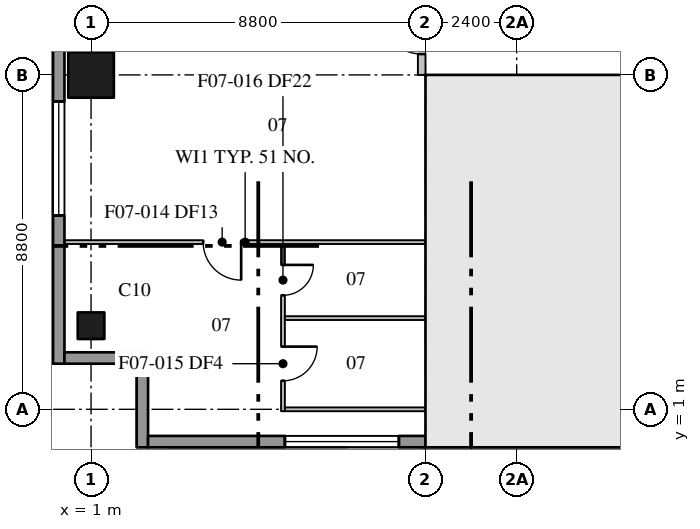
"""IFC4 building model, lengths in metres.
Left out: names, types, materials, properties, quantities, classifications, styles, units other than length and angle.
Written with IfcOpenShell. Run it as: python <this file> out.ifc"""

import sys

from ifc_helpers import new_model, si_unit, direction, frame, frame_2d, origin, origin_2d, place, context, subcontext, project, spatial, rectangle, extrude, element, fill, save


model = new_model("IFC4")
c1 = context("Model", 3, precision=1e-05, world=origin(), true_north=direction((0.0, 1.0)))
c2 = subcontext(c1, "Body", "Model", "MODEL_VIEW")
j1 = project(units=[si_unit("LENGTHUNIT", "METRE"), si_unit("PLANEANGLEUNIT", "RADIAN")], contexts=[c1])
p1 = place(None, origin())
s1 = spatial("IfcSite", under=j1, at=p1, CompositionType="ELEMENT")
p2 = place(p1, origin())
s2 = spatial("IfcBuilding", under=s1, at=p2, CompositionType="ELEMENT")
p3 = place(p2, frame((0.0, 0.0, 87.1)))
s3 = spatial("IfcBuildingStorey", under=s2, at=p3, CompositionType="ELEMENT", Elevation=87.1)
p4 = place(p3, frame((1.0, 3.2, 0.0), z_axis=(0.0, 0.0, 1.0), x_axis=(1.0, 0.0, 0.0)))
e1 = element("IfcColumn", 1, at=p4, inside=s3, PredefinedType="COLUMN", context=c2, shape_type="SweptSolid", body=[
    extrude(rectangle(XDim=0.7, YDim=0.7, at=origin_2d()), origin(), (0.0, 0.0, 1.0), 3.7),
])
p5 = place(p3, frame((1.0, 9.8, 0.0), z_axis=(0.0, 0.0, 1.0), x_axis=(1.0, 0.0, 0.0)))
e2 = element("IfcColumn", 2, at=p5, inside=s3, PredefinedType="COLUMN", context=c2, shape_type="SweptSolid", body=[
    extrude(rectangle(XDim=1.2, YDim=1.2, at=origin_2d()), origin(), (0.0, 0.0, 1.0), 3.7),
])
p6 = place(p3, frame((9.8, 0.8, 0.0), z_axis=(0.0, 0.0, 1.0), x_axis=(1.0, 0.0, 0.0)))
e3 = element("IfcWall", 3, at=p6, inside=s3, PredefinedType="SHEAR", context=c2, shape_type="SweptSolid", body=[
    extrude(rectangle(XDim=35.2, YDim=0.8, at=frame_2d((17.6, 0.0))), origin(), (0.0, 0.0, 1.0), 3.7),
])
p7 = place(p3, frame((10.6, 1.2, 0.0), z_axis=(0.0, 0.0, 1.0), x_axis=(0.0, 1.0, 0.0)))
e4 = element("IfcWall", 4, at=p7, inside=s3, PredefinedType="SHEAR", context=c2, shape_type="SweptSolid", body=[
    extrude(rectangle(XDim=8.6, YDim=0.8, at=frame_2d((4.3, 0.0))), origin(), (0.0, 0.0, 1.0), 3.7),
])
p8 = place(p3, frame((9.8, 9.6, 0.0), z_axis=(0.0, 0.0, 1.0), x_axis=(1.0, 0.0, 0.0)))
e5 = element("IfcWall", 5, at=p8, inside=s3, PredefinedType="SHEAR", context=c2, shape_type="SweptSolid", body=[
    extrude(rectangle(XDim=4.3, YDim=0.4, at=frame_2d((2.15, 0.0))), origin(), (0.0, 0.0, 1.0), 3.7),
])
p9 = place(p8, frame((2.05, 0.0, 0.0)))
e6 = element("IfcOpeningElement", 6, at=p9, cuts=e5, PredefinedType="OPENING", context=c2, shape_type="SweptSolid", body=[
    extrude(rectangle(XDim=1.2, YDim=2.1, at=frame_2d((0.6, 1.05))), frame((0.0, 0.21, 0.0), z_axis=(0.0, -1.0, 0.0), x_axis=(1.0, 0.0, 0.0)), (0.0, 0.0, 1.0), 0.42),
])
p10 = place(p3, frame((14.1, 9.6, 0.0), z_axis=(0.0, 0.0, 1.0), x_axis=(1.0, 0.0, 0.0)))
e7 = element("IfcWall", 7, at=p10, inside=s3, PredefinedType="SHEAR", context=c2, shape_type="SweptSolid", body=[
    extrude(rectangle(XDim=10.4, YDim=0.4, at=frame_2d((5.2, 0.0))), origin(), (0.0, 0.0, 1.0), 3.7),
])
p11 = place(p10, frame((0.8, 0.0, 0.0)))
e8 = element("IfcOpeningElement", 8, at=p11, cuts=e7, PredefinedType="OPENING", context=c2, shape_type="SweptSolid", body=[
    extrude(rectangle(XDim=1.0, YDim=2.1, at=frame_2d((0.5, 1.05))), frame((0.0, 0.21, 0.0), z_axis=(0.0, -1.0, 0.0), x_axis=(1.0, 0.0, 0.0)), (0.0, 0.0, 1.0), 0.42),
])
p12 = place(p10, frame((6.0, 0.0, 0.0)))
e9 = element("IfcOpeningElement", 9, at=p12, cuts=e7, PredefinedType="OPENING", context=c2, shape_type="SweptSolid", body=[
    extrude(rectangle(XDim=1.0, YDim=2.1, at=frame_2d((0.5, 1.05))), frame((0.0, 0.21, 0.0), z_axis=(0.0, -1.0, 0.0), x_axis=(1.0, 0.0, 0.0)), (0.0, 0.0, 1.0), 0.42),
])
p13 = place(p3, frame((14.1, 3.8, 0.0), z_axis=(0.0, 0.0, 1.0), x_axis=(1.0, 0.0, 0.0)))
e10 = element("IfcWall", 10, at=p13, inside=s3, PredefinedType="SHEAR", context=c2, shape_type="SweptSolid", body=[
    extrude(rectangle(XDim=26.6, YDim=0.4, at=frame_2d((13.3, 0.0))), origin(), (0.0, 0.0, 1.0), 3.7),
])
p14 = place(p13, frame((0.95, 0.0, 0.0)))
e11 = element("IfcOpeningElement", 11, at=p14, cuts=e10, PredefinedType="OPENING", context=c2, shape_type="SweptSolid", body=[
    extrude(rectangle(XDim=1.3, YDim=2.1, at=frame_2d((0.65, 1.05))), frame((0.0, 0.21, 0.0), z_axis=(0.0, -1.0, 0.0), x_axis=(1.0, 0.0, 0.0)), (0.0, 0.0, 1.0), 0.42),
])
p15 = place(p13, frame((3.95, 0.0, 0.0)))
e12 = element("IfcOpeningElement", 12, at=p15, cuts=e10, PredefinedType="OPENING", context=c2, shape_type="SweptSolid", body=[
    extrude(rectangle(XDim=1.1, YDim=2.1, at=frame_2d((0.55, 1.05))), frame((0.0, 0.21, 0.0), z_axis=(0.0, -1.0, 0.0), x_axis=(1.0, 0.0, 0.0)), (0.0, 0.0, 1.0), 0.42),
])
p16 = place(p13, frame((6.55, 0.0, 0.0)))
e13 = element("IfcOpeningElement", 13, at=p16, cuts=e10, PredefinedType="OPENING", context=c2, shape_type="SweptSolid", body=[
    extrude(rectangle(XDim=1.1, YDim=2.1, at=frame_2d((0.55, 1.05))), frame((0.0, 0.21, 0.0), z_axis=(0.0, -1.0, 0.0), x_axis=(1.0, 0.0, 0.0)), (0.0, 0.0, 1.0), 0.42),
])
p17 = place(p13, frame((9.15, 0.0, 0.0)))
e14 = element("IfcOpeningElement", 14, at=p17, cuts=e10, PredefinedType="OPENING", context=c2, shape_type="SweptSolid", body=[
    extrude(rectangle(XDim=1.1, YDim=2.1, at=frame_2d((0.55, 1.05))), frame((0.0, 0.21, 0.0), z_axis=(0.0, -1.0, 0.0), x_axis=(1.0, 0.0, 0.0)), (0.0, 0.0, 1.0), 0.42),
])
p18 = place(p13, frame((11.75, 0.0, 0.0)))
e15 = element("IfcOpeningElement", 15, at=p18, cuts=e10, PredefinedType="OPENING", context=c2, shape_type="SweptSolid", body=[
    extrude(rectangle(XDim=1.1, YDim=2.1, at=frame_2d((0.55, 1.05))), frame((0.0, 0.21, 0.0), z_axis=(0.0, -1.0, 0.0), x_axis=(1.0, 0.0, 0.0)), (0.0, 0.0, 1.0), 0.42),
])
p19 = place(p13, frame((14.35, 0.0, 0.0)))
e16 = element("IfcOpeningElement", 16, at=p19, cuts=e10, PredefinedType="OPENING", context=c2, shape_type="SweptSolid", body=[
    extrude(rectangle(XDim=1.1, YDim=2.1, at=frame_2d((0.55, 1.05))), frame((0.0, 0.21, 0.0), z_axis=(0.0, -1.0, 0.0), x_axis=(1.0, 0.0, 0.0)), (0.0, 0.0, 1.0), 0.42),
])
p20 = place(p13, frame((16.95, 0.0, 0.0)))
e17 = element("IfcOpeningElement", 17, at=p20, cuts=e10, PredefinedType="OPENING", context=c2, shape_type="SweptSolid", body=[
    extrude(rectangle(XDim=1.1, YDim=2.1, at=frame_2d((0.55, 1.05))), frame((0.0, 0.21, 0.0), z_axis=(0.0, -1.0, 0.0), x_axis=(1.0, 0.0, 0.0)), (0.0, 0.0, 1.0), 0.42),
])
p21 = place(p13, frame((19.55, 0.0, 0.0)))
e18 = element("IfcOpeningElement", 18, at=p21, cuts=e10, PredefinedType="OPENING", context=c2, shape_type="SweptSolid", body=[
    extrude(rectangle(XDim=1.1, YDim=2.1, at=frame_2d((0.55, 1.05))), frame((0.0, 0.21, 0.0), z_axis=(0.0, -1.0, 0.0), x_axis=(1.0, 0.0, 0.0)), (0.0, 0.0, 1.0), 0.42),
])
p22 = place(p3, frame((14.1, 6.8, 0.0), z_axis=(0.0, 0.0, 1.0), x_axis=(1.0, 0.0, 0.0)))
e19 = element("IfcWall", 19, at=p22, inside=s3, PredefinedType="SHEAR", context=c2, shape_type="SweptSolid", body=[
    extrude(rectangle(XDim=26.6, YDim=0.4, at=frame_2d((13.3, 0.0))), origin(), (0.0, 0.0, 1.0), 3.7),
])
p23 = place(p22, frame((10.8, 0.0, 0.0)))
e20 = element("IfcOpeningElement", 20, at=p23, cuts=e19, PredefinedType="OPENING", context=c2, shape_type="SweptSolid", body=[
    extrude(rectangle(XDim=1.8, YDim=2.1, at=frame_2d((0.9, 1.05))), frame((0.0, 0.21, 0.0), z_axis=(0.0, -1.0, 0.0), x_axis=(1.0, 0.0, 0.0)), (0.0, 0.0, 1.0), 0.42),
])
p24 = place(p22, frame((24.35, 0.0, 0.0)))
e21 = element("IfcOpeningElement", 21, at=p24, cuts=e19, PredefinedType="OPENING", context=c2, shape_type="SweptSolid", body=[
    extrude(rectangle(XDim=1.3, YDim=2.1, at=frame_2d((0.65, 1.05))), frame((0.0, 0.21, 0.0), z_axis=(0.0, -1.0, 0.0), x_axis=(1.0, 0.0, 0.0)), (0.0, 0.0, 1.0), 0.42),
])
p25 = place(p3, frame((14.1, 1.2, 0.0), z_axis=(0.0, 0.0, 1.0), x_axis=(0.0, 1.0, 0.0)))
e22 = element("IfcWall", 22, at=p25, inside=s3, PredefinedType="SHEAR", context=c2, shape_type="SweptSolid", body=[
    extrude(rectangle(XDim=8.4, YDim=0.4, at=frame_2d((4.2, 0.0))), origin(), (0.0, 0.0, 1.0), 3.7),
])
p26 = place(p25, frame((4.45, 0.0, 0.0)))
e23 = element("IfcOpeningElement", 23, at=p26, cuts=e22, PredefinedType="OPENING", context=c2, shape_type="SweptSolid", body=[
    extrude(rectangle(XDim=0.9, YDim=2.1, at=frame_2d((0.45, 1.05))), frame((0.0, 0.21, 0.0), z_axis=(0.0, -1.0, 0.0), x_axis=(1.0, 0.0, 0.0)), (0.0, 0.0, 1.0), 0.42),
])
p27 = place(p3, frame((0.15, 78.7, 0.0), z_axis=(0.0, 0.0, 1.0), x_axis=(0.0, -1.0, 0.0)))
e24 = element("IfcWall", 24, at=p27, inside=s3, PredefinedType="STANDARD", context=c2, shape_type="SweptSolid", body=[
    extrude(rectangle(XDim=76.5, YDim=0.3, at=frame_2d((38.25, 0.0))), origin(), (0.0, 0.0, 1.0), 3.4),
])
p28 = place(p27, frame((3.6, 0.0, 0.75)))
e25 = element("IfcOpeningElement", 25, at=p28, cuts=e24, PredefinedType="OPENING", context=c2, shape_type="SweptSolid", body=[
    extrude(rectangle(XDim=3.0, YDim=2.3, at=frame_2d((1.5, 1.15))), frame((0.0, 0.16, 0.0), z_axis=(0.0, -1.0, 0.0), x_axis=(1.0, 0.0, 0.0)), (0.0, 0.0, 1.0), 0.32),
])
p29 = place(p27, frame((8.0, 0.0, 0.75)))
e26 = element("IfcOpeningElement", 26, at=p29, cuts=e24, PredefinedType="OPENING", context=c2, shape_type="SweptSolid", body=[
    extrude(rectangle(XDim=3.0, YDim=2.3, at=frame_2d((1.5, 1.15))), frame((0.0, 0.16, 0.0), z_axis=(0.0, -1.0, 0.0), x_axis=(1.0, 0.0, 0.0)), (0.0, 0.0, 1.0), 0.32),
])
p30 = place(p27, frame((12.4, 0.0, 0.75)))
e27 = element("IfcOpeningElement", 27, at=p30, cuts=e24, PredefinedType="OPENING", context=c2, shape_type="SweptSolid", body=[
    extrude(rectangle(XDim=3.0, YDim=2.3, at=frame_2d((1.5, 1.15))), frame((0.0, 0.16, 0.0), z_axis=(0.0, -1.0, 0.0), x_axis=(1.0, 0.0, 0.0)), (0.0, 0.0, 1.0), 0.32),
])
p31 = place(p27, frame((16.8, 0.0, 0.75)))
e28 = element("IfcOpeningElement", 28, at=p31, cuts=e24, PredefinedType="OPENING", context=c2, shape_type="SweptSolid", body=[
    extrude(rectangle(XDim=3.0, YDim=2.3, at=frame_2d((1.5, 1.15))), frame((0.0, 0.16, 0.0), z_axis=(0.0, -1.0, 0.0), x_axis=(1.0, 0.0, 0.0)), (0.0, 0.0, 1.0), 0.32),
])
p32 = place(p27, frame((21.2, 0.0, 0.75)))
e29 = element("IfcOpeningElement", 29, at=p32, cuts=e24, PredefinedType="OPENING", context=c2, shape_type="SweptSolid", body=[
    extrude(rectangle(XDim=3.0, YDim=2.3, at=frame_2d((1.5, 1.15))), frame((0.0, 0.16, 0.0), z_axis=(0.0, -1.0, 0.0), x_axis=(1.0, 0.0, 0.0)), (0.0, 0.0, 1.0), 0.32),
])
p33 = place(p27, frame((25.6, 0.0, 0.75)))
e30 = element("IfcOpeningElement", 30, at=p33, cuts=e24, PredefinedType="OPENING", context=c2, shape_type="SweptSolid", body=[
    extrude(rectangle(XDim=3.0, YDim=2.3, at=frame_2d((1.5, 1.15))), frame((0.0, 0.16, 0.0), z_axis=(0.0, -1.0, 0.0), x_axis=(1.0, 0.0, 0.0)), (0.0, 0.0, 1.0), 0.32),
])
p34 = place(p27, frame((30.0, 0.0, 0.75)))
e31 = element("IfcOpeningElement", 31, at=p34, cuts=e24, PredefinedType="OPENING", context=c2, shape_type="SweptSolid", body=[
    extrude(rectangle(XDim=3.0, YDim=2.3, at=frame_2d((1.5, 1.15))), frame((0.0, 0.16, 0.0), z_axis=(0.0, -1.0, 0.0), x_axis=(1.0, 0.0, 0.0)), (0.0, 0.0, 1.0), 0.32),
])
p35 = place(p27, frame((34.4, 0.0, 0.75)))
e32 = element("IfcOpeningElement", 32, at=p35, cuts=e24, PredefinedType="OPENING", context=c2, shape_type="SweptSolid", body=[
    extrude(rectangle(XDim=3.0, YDim=2.3, at=frame_2d((1.5, 1.15))), frame((0.0, 0.16, 0.0), z_axis=(0.0, -1.0, 0.0), x_axis=(1.0, 0.0, 0.0)), (0.0, 0.0, 1.0), 0.32),
])
p36 = place(p27, frame((38.8, 0.0, 0.75)))
e33 = element("IfcOpeningElement", 33, at=p36, cuts=e24, PredefinedType="OPENING", context=c2, shape_type="SweptSolid", body=[
    extrude(rectangle(XDim=3.0, YDim=2.3, at=frame_2d((1.5, 1.15))), frame((0.0, 0.16, 0.0), z_axis=(0.0, -1.0, 0.0), x_axis=(1.0, 0.0, 0.0)), (0.0, 0.0, 1.0), 0.32),
])
p37 = place(p27, frame((43.2, 0.0, 0.75)))
e34 = element("IfcOpeningElement", 34, at=p37, cuts=e24, PredefinedType="OPENING", context=c2, shape_type="SweptSolid", body=[
    extrude(rectangle(XDim=3.0, YDim=2.3, at=frame_2d((1.5, 1.15))), frame((0.0, 0.16, 0.0), z_axis=(0.0, -1.0, 0.0), x_axis=(1.0, 0.0, 0.0)), (0.0, 0.0, 1.0), 0.32),
])
p38 = place(p27, frame((47.6, 0.0, 0.75)))
e35 = element("IfcOpeningElement", 35, at=p38, cuts=e24, PredefinedType="OPENING", context=c2, shape_type="SweptSolid", body=[
    extrude(rectangle(XDim=3.0, YDim=2.3, at=frame_2d((1.5, 1.15))), frame((0.0, 0.16, 0.0), z_axis=(0.0, -1.0, 0.0), x_axis=(1.0, 0.0, 0.0)), (0.0, 0.0, 1.0), 0.32),
])
p39 = place(p27, frame((52.0, 0.0, 0.75)))
e36 = element("IfcOpeningElement", 36, at=p39, cuts=e24, PredefinedType="OPENING", context=c2, shape_type="SweptSolid", body=[
    extrude(rectangle(XDim=3.0, YDim=2.3, at=frame_2d((1.5, 1.15))), frame((0.0, 0.16, 0.0), z_axis=(0.0, -1.0, 0.0), x_axis=(1.0, 0.0, 0.0)), (0.0, 0.0, 1.0), 0.32),
])
p40 = place(p27, frame((56.4, 0.0, 0.75)))
e37 = element("IfcOpeningElement", 37, at=p40, cuts=e24, PredefinedType="OPENING", context=c2, shape_type="SweptSolid", body=[
    extrude(rectangle(XDim=3.0, YDim=2.3, at=frame_2d((1.5, 1.15))), frame((0.0, 0.16, 0.0), z_axis=(0.0, -1.0, 0.0), x_axis=(1.0, 0.0, 0.0)), (0.0, 0.0, 1.0), 0.32),
])
p41 = place(p27, frame((60.8, 0.0, 0.75)))
e38 = element("IfcOpeningElement", 38, at=p41, cuts=e24, PredefinedType="OPENING", context=c2, shape_type="SweptSolid", body=[
    extrude(rectangle(XDim=3.0, YDim=2.3, at=frame_2d((1.5, 1.15))), frame((0.0, 0.16, 0.0), z_axis=(0.0, -1.0, 0.0), x_axis=(1.0, 0.0, 0.0)), (0.0, 0.0, 1.0), 0.32),
])
p42 = place(p27, frame((65.2, 0.0, 0.75)))
e39 = element("IfcOpeningElement", 39, at=p42, cuts=e24, PredefinedType="OPENING", context=c2, shape_type="SweptSolid", body=[
    extrude(rectangle(XDim=3.0, YDim=2.3, at=frame_2d((1.5, 1.15))), frame((0.0, 0.16, 0.0), z_axis=(0.0, -1.0, 0.0), x_axis=(1.0, 0.0, 0.0)), (0.0, 0.0, 1.0), 0.32),
])
p43 = place(p27, frame((69.6, 0.0, 0.75)))
e40 = element("IfcOpeningElement", 40, at=p43, cuts=e24, PredefinedType="OPENING", context=c2, shape_type="SweptSolid", body=[
    extrude(rectangle(XDim=3.0, YDim=2.3, at=frame_2d((1.5, 1.15))), frame((0.0, 0.16, 0.0), z_axis=(0.0, -1.0, 0.0), x_axis=(1.0, 0.0, 0.0)), (0.0, 0.0, 1.0), 0.32),
])
for number, where, z_axis, x_axis in (
    (41, (0.3, 2.35, 0.0), (0.0, 0.0, 1.0), (1.0, 0.0, 0.0)),
    (42, (2.35, 2.2, 0.0), (0.0, 0.0, 1.0), (0.0, -1.0, 0.0)),
):
    element("IfcWall", number, at=place(p3, frame(where, z_axis=z_axis, x_axis=x_axis)), inside=s3, PredefinedType="STANDARD", context=c2, shape_type="SweptSolid", body=[
        extrude(rectangle(XDim=2.2, YDim=0.3, at=frame_2d((1.1, 0.0))), origin(), (0.0, 0.0, 1.0), 3.4),
    ])
p44 = place(p3, frame((2.5, 0.15, 0.0), z_axis=(0.0, 0.0, 1.0), x_axis=(1.0, 0.0, 0.0)))
e43 = element("IfcWall", 43, at=p44, inside=s3, PredefinedType="STANDARD", context=c2, shape_type="SweptSolid", body=[
    extrude(rectangle(XDim=7.3, YDim=0.3, at=frame_2d((3.65, 0.0))), origin(), (0.0, 0.0, 1.0), 3.4),
])
p45 = place(p44, frame((3.6, 0.0, 0.75)))
e44 = element("IfcOpeningElement", 44, at=p45, cuts=e43, PredefinedType="OPENING", context=c2, shape_type="SweptSolid", body=[
    extrude(rectangle(XDim=3.0, YDim=2.3, at=frame_2d((1.5, 1.15))), frame((0.0, 0.16, 0.0), z_axis=(0.0, -1.0, 0.0), x_axis=(1.0, 0.0, 0.0)), (0.0, 0.0, 1.0), 0.32),
])
p46 = place(p3, frame((14.1, 0.15, 0.0), z_axis=(0.0, 0.0, 1.0), x_axis=(1.0, 0.0, 0.0)))
e45 = element("IfcWall", 45, at=p46, inside=s3, PredefinedType="STANDARD", context=c2, shape_type="SweptSolid", body=[
    extrude(rectangle(XDim=26.6, YDim=0.3, at=frame_2d((13.3, 0.0))), origin(), (0.0, 0.0, 1.0), 3.4),
])
p47 = place(p3, frame((9.7, 9.8, 0.0), z_axis=(0.0, 0.0, 1.0), x_axis=(0.0, 1.0, 0.0)))
e46 = element("IfcWall", 46, at=p47, inside=s3, PredefinedType="PARTITIONING", context=c2, shape_type="SweptSolid", body=[
    extrude(rectangle(XDim=1.7, YDim=0.2, at=frame_2d((0.85, 0.0))), origin(), (0.0, 0.0, 1.0), 3.4),
])
p48 = place(p47, frame((0.55, 0.0, 0.0)))
e47 = element("IfcOpeningElement", 47, at=p48, cuts=e46, PredefinedType="OPENING", context=c2, shape_type="SweptSolid", body=[
    extrude(rectangle(XDim=1.1, YDim=2.1, at=frame_2d((0.55, 1.05))), frame((0.0, 0.11, 0.0), z_axis=(0.0, -1.0, 0.0), x_axis=(1.0, 0.0, 0.0)), (0.0, 0.0, 1.0), 0.22),
])
p49 = place(p3, frame((6.05, 5.35, 0.0), z_axis=(0.0, 0.0, 1.0), x_axis=(0.0, -1.0, 0.0)))
e48 = element("IfcWall", 48, at=p49, inside=s3, PredefinedType="PARTITIONING", context=c2, shape_type="SweptSolid", body=[
    extrude(rectangle(XDim=4.4, YDim=0.1, at=frame_2d((2.2, 0.0))), origin(), (0.0, 0.0, 1.0), 3.4),
])
p50 = place(p49, frame((2.7, 0.0, 0.0)))
e49 = element("IfcOpeningElement", 49, at=p50, cuts=e48, PredefinedType="OPENING", context=c2, shape_type="SweptSolid", body=[
    extrude(rectangle(XDim=0.9, YDim=2.1, at=frame_2d((0.45, 1.05))), frame((0.0, 0.06, 0.0), z_axis=(0.0, -1.0, 0.0), x_axis=(1.0, 0.0, 0.0)), (0.0, 0.0, 1.0), 0.12),
])
p51 = place(p49, frame((0.55, 0.0, 0.0)))
e50 = element("IfcOpeningElement", 50, at=p51, cuts=e48, PredefinedType="OPENING", context=c2, shape_type="SweptSolid", body=[
    extrude(rectangle(XDim=0.8, YDim=2.1, at=frame_2d((0.4, 1.05))), frame((0.0, 0.06, 0.0), z_axis=(0.0, -1.0, 0.0), x_axis=(1.0, 0.0, 0.0)), (0.0, 0.0, 1.0), 0.12),
])
p52 = place(p3, frame((9.8, 5.4, 0.0), z_axis=(0.0, 0.0, 1.0), x_axis=(-1.0, 0.0, 0.0)))
e51 = element("IfcWall", 51, at=p52, inside=s3, PredefinedType="PARTITIONING", context=c2, shape_type="SweptSolid", body=[
    extrude(rectangle(XDim=9.49, YDim=0.1, at=frame_2d((4.745, 0.0))), origin(), (0.0, 0.0, 1.0), 3.4),
])
p53 = place(p52, frame((4.85, 0.0, 0.0)))
e52 = element("IfcOpeningElement", 52, at=p53, cuts=e51, PredefinedType="OPENING", context=c2, shape_type="SweptSolid", body=[
    extrude(rectangle(XDim=1.0, YDim=2.1, at=frame_2d((0.5, 1.05))), frame((0.0, 0.06, 0.0), z_axis=(0.0, -1.0, 0.0), x_axis=(1.0, 0.0, 0.0)), (0.0, 0.0, 1.0), 0.12),
])
for number, where, z_axis, x_axis in (
    (53, (6.1, 1.0, 0.0), (0.0, 0.0, 1.0), (1.0, 0.0, 0.0)),
    (54, (6.1, 3.4, 0.0), (0.0, 0.0, 1.0), (1.0, 0.0, 0.0)),
):
    element("IfcWall", number, at=place(p3, frame(where, z_axis=z_axis, x_axis=x_axis)), inside=s3, PredefinedType="PARTITIONING", context=c2, shape_type="SweptSolid", body=[
        extrude(rectangle(XDim=3.7, YDim=0.1, at=frame_2d((1.85, 0.0))), origin(), (0.0, 0.0, 1.0), 3.4),
    ])
p54 = place(p43, origin())
e55 = element("IfcWindow", 55, at=p54, inside=s3, PartitioningType="SINGLE_PANEL", PredefinedType="WINDOW", context=c2, shape_type="SweptSolid", body=[
    extrude(rectangle(XDim=3.0, YDim=2.3, at=frame_2d((1.5, 1.15))), frame((0.0, 0.03, 0.0), z_axis=(0.0, -1.0, 0.0), x_axis=(1.0, 0.0, 0.0)), (0.0, 0.0, 1.0), 0.06),
])
fill(e40, e55)
p55 = place(p45, origin())
e56 = element("IfcWindow", 56, at=p55, inside=s3, PartitioningType="SINGLE_PANEL", PredefinedType="WINDOW", context=c2, shape_type="SweptSolid", body=[
    extrude(rectangle(XDim=3.0, YDim=2.3, at=frame_2d((1.5, 1.15))), frame((0.0, 0.03, 0.0), z_axis=(0.0, -1.0, 0.0), x_axis=(1.0, 0.0, 0.0)), (0.0, 0.0, 1.0), 0.06),
])
fill(e44, e56)
p56 = place(p9, frame((1.2, 0.0, 0.0), z_axis=(0.0, 0.0, 1.0), x_axis=(-1.0, 0.0, 0.0)))
e57 = element("IfcDoor", 57, at=p56, inside=s3, OperationType="SINGLE_SWING_LEFT", PredefinedType="DOOR", context=c2, shape_type="SweptSolid", body=[
    extrude(rectangle(XDim=1.2, YDim=2.1, at=frame_2d((0.6, 1.05))), frame((0.0, 0.025, 0.0), z_axis=(0.0, -1.0, 0.0), x_axis=(1.0, 0.0, 0.0)), (0.0, 0.0, 1.0), 0.05),
])
fill(e6, e57)
p57 = place(p26, origin())
e58 = element("IfcDoor", 58, at=p57, inside=s3, OperationType="SINGLE_SWING_RIGHT", PredefinedType="DOOR", context=c2, shape_type="SweptSolid", body=[
    extrude(rectangle(XDim=0.9, YDim=2.1, at=frame_2d((0.45, 1.05))), frame((0.0, 0.025, 0.0), z_axis=(0.0, -1.0, 0.0), x_axis=(1.0, 0.0, 0.0)), (0.0, 0.0, 1.0), 0.05),
])
fill(e23, e58)
p58 = place(p48, origin())
e59 = element("IfcDoor", 59, at=p58, inside=s3, OperationType="SINGLE_SWING_RIGHT", PredefinedType="DOOR", context=c2, shape_type="SweptSolid", body=[
    extrude(rectangle(XDim=1.1, YDim=2.1, at=frame_2d((0.55, 1.05))), frame((0.0, 0.025, 0.0), z_axis=(0.0, -1.0, 0.0), x_axis=(1.0, 0.0, 0.0)), (0.0, 0.0, 1.0), 0.05),
])
fill(e47, e59)
p59 = place(p53, origin())
e60 = element("IfcDoor", 60, at=p59, inside=s3, OperationType="SINGLE_SWING_LEFT", PredefinedType="DOOR", context=c2, shape_type="SweptSolid", body=[
    extrude(rectangle(XDim=1.0, YDim=2.1, at=frame_2d((0.5, 1.05))), frame((0.0, 0.025, 0.0), z_axis=(0.0, -1.0, 0.0), x_axis=(1.0, 0.0, 0.0)), (0.0, 0.0, 1.0), 0.05),
])
fill(e52, e60)
p60 = place(p50, origin())
e61 = element("IfcDoor", 61, at=p60, inside=s3, OperationType="SINGLE_SWING_LEFT", PredefinedType="DOOR", context=c2, shape_type="SweptSolid", body=[
    extrude(rectangle(XDim=0.9, YDim=2.1, at=frame_2d((0.45, 1.05))), frame((0.0, 0.025, 0.0), z_axis=(0.0, -1.0, 0.0), x_axis=(1.0, 0.0, 0.0)), (0.0, 0.0, 1.0), 0.05),
])
fill(e49, e61)
p61 = place(p51, origin())
e62 = element("IfcDoor", 62, at=p61, inside=s3, OperationType="SINGLE_SWING_LEFT", PredefinedType="DOOR", context=c2, shape_type="SweptSolid", body=[
    extrude(rectangle(XDim=0.8, YDim=2.1, at=frame_2d((0.4, 1.05))), frame((0.0, 0.025, 0.0), z_axis=(0.0, -1.0, 0.0), x_axis=(1.0, 0.0, 0.0)), (0.0, 0.0, 1.0), 0.05),
])
fill(e50, e62)
save(model, sys.argv[1])
